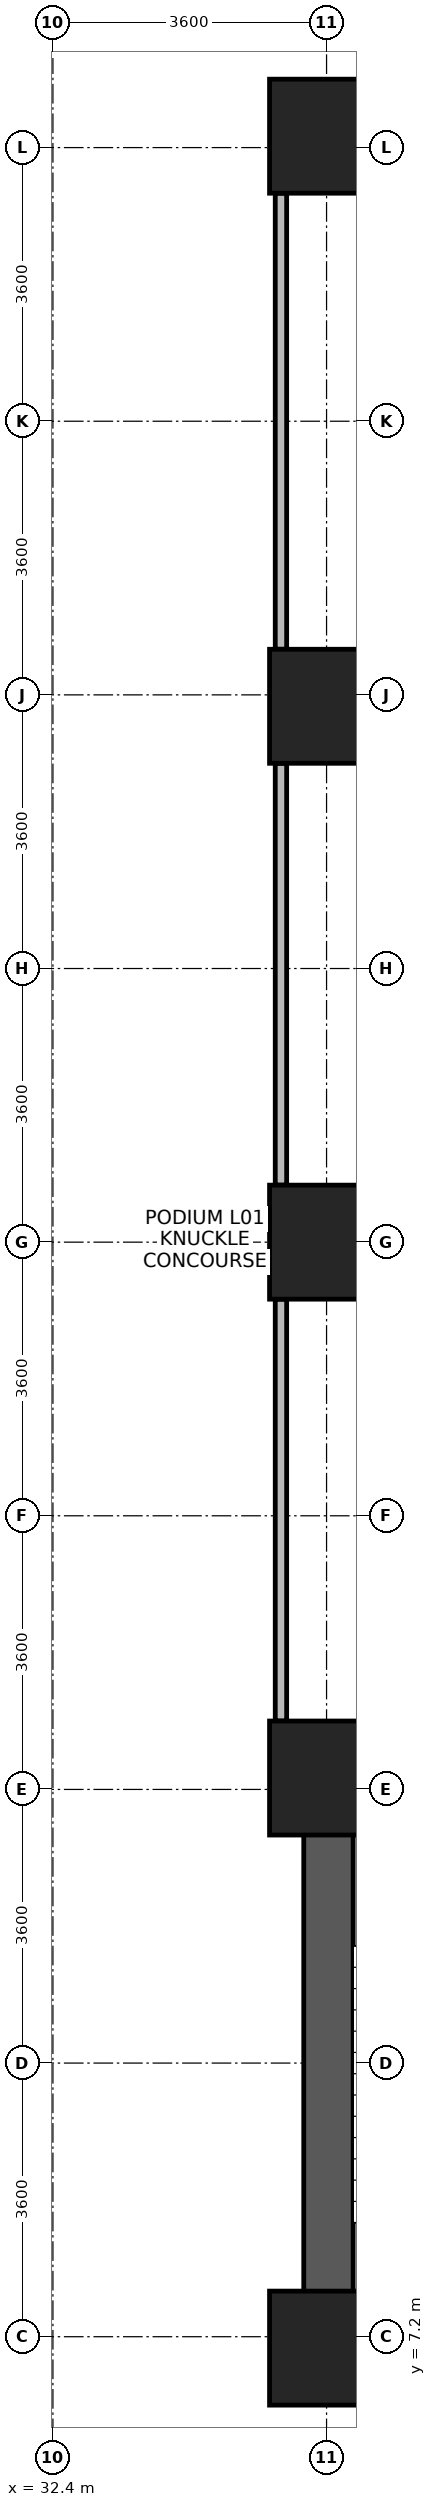
"""IFC4 building model, lengths in metres.
Left out: names, types, materials, properties, quantities, classifications, styles, units other than length and angle.
Written with IfcOpenShell. Run it as: python <this file> out.ifc"""

import sys

from ifc_helpers import new_model, si_unit, direction, frame, frame_2d, origin, origin_2d, place, context, subcontext, project, spatial, rectangle, extrude, source, transform, mapped, element, save


model = new_model("IFC4")
c1 = context("Model", 3, precision=1e-05, world=origin(), true_north=direction((0.0, 1.0)))
c2 = subcontext(c1, "Body", "Model", "MODEL_VIEW")
j1 = project(units=[si_unit("LENGTHUNIT", "METRE"), si_unit("PLANEANGLEUNIT", "RADIAN")], contexts=[c1])
p1 = place(None, origin())
s1 = spatial("IfcSite", under=j1, at=p1, CompositionType="ELEMENT")
p2 = place(p1, origin())
s2 = spatial("IfcBuilding", under=s1, at=p2, CompositionType="ELEMENT")
p3 = place(p2, frame((0.0, 0.0, 5.4)))
s3 = spatial("IfcBuildingStorey", under=s2, at=p3, CompositionType="ELEMENT", Elevation=5.4)
p4 = place(p3, frame((36.025, 6.65, 0.0), z_axis=(0.0, 0.0, 1.0), x_axis=(0.0, 1.0, 0.0)))
e1 = element("IfcWall", 1, at=p4, inside=s3, PredefinedType="SHEAR", context=c2, shape_type="SweptSolid", body=[
    extrude(rectangle(XDim=8.3, YDim=0.65, at=frame_2d((4.15, 0.0))), origin(), (0.0, 0.0, 1.0), 4.52),
])
for number, where, z_axis, x_axis in (
    (2, (36.35, 6.975, 0.0), (0.0, 0.0, 1.0), (1.0, 0.0, 0.0)),
    (3, (36.35, 14.625, 0.0), (0.0, 0.0, 1.0), (1.0, 0.0, 0.0)),
):
    element("IfcWall", number, at=place(p3, frame(where, z_axis=z_axis, x_axis=x_axis)), inside=s3, PredefinedType="SHEAR", context=c2, shape_type="SweptSolid", body=[
        extrude(rectangle(XDim=3.2, YDim=0.65, at=frame_2d((1.6, 0.0))), origin(), (0.0, 0.0, 1.0), 4.52),
    ])
m1 = source(origin(), c2, "Body", "SweptSolid", [
    extrude(rectangle(XDim=1.5, YDim=1.5, at=origin_2d()), origin(), (0.0, 0.0, 1.0), 4.8),
])
for number, where, z_axis, x_axis in (
    (4, (36.0, 21.6, 0.0), (0.0, 0.0, 1.0), (1.0, 0.0, 0.0)),
    (5, (36.0, 28.65, 0.0), (0.0, 0.0, 1.0), (1.0, 0.0, 0.0)),
    (6, (36.0, 36.15, 0.0), (0.0, 0.0, 1.0), (1.0, 0.0, 0.0)),
    (7, (36.0, 7.05, 0.0), (0.0, 0.0, 1.0), (1.0, 0.0, 0.0)),
    (8, (36.0, 14.55, 0.0), (0.0, 0.0, 1.0), (1.0, 0.0, 0.0)),
):
    element("IfcColumn", number, at=place(p3, frame(where, z_axis=z_axis, x_axis=x_axis)), inside=s3, PredefinedType="COLUMN", context=c2, shape_type="MappedRepresentation", body=[
        mapped(m1, transform((0.0, 0.0, 0.0), x_axis=(1.0, 0.0, 0.0), y_axis=(0.0, 1.0, 0.0), z_axis=(0.0, 0.0, 1.0), scale=1.0)),
    ])
p5 = place(p3, frame((35.4, 15.3, 0.0), z_axis=(0.0, 0.0, 1.0), x_axis=(0.0, 1.0, 0.0)))
e9 = element("IfcWall", 9, at=p5, inside=s3, PredefinedType="PARTITIONING", context=c2, shape_type="SweptSolid", body=[
    extrude(rectangle(XDim=5.55, YDim=0.15, at=frame_2d((2.775, 0.0))), origin(), (0.0, 0.0, 1.0), 4.5),
])
p6 = place(p3, frame((35.4, 22.35, 0.0), z_axis=(0.0, 0.0, 1.0), x_axis=(0.0, 1.0, 0.0)))
e10 = element("IfcWall", 10, at=p6, inside=s3, PredefinedType="PARTITIONING", context=c2, shape_type="SweptSolid", body=[
    extrude(rectangle(XDim=5.55, YDim=0.15, at=frame_2d((2.775, 0.0))), origin(), (0.0, 0.0, 1.0), 4.5),
])
p7 = place(p3, frame((35.4, 29.4, 0.0), z_axis=(0.0, 0.0, 1.0), x_axis=(0.0, 1.0, 0.0)))
e11 = element("IfcWall", 11, at=p7, inside=s3, PredefinedType="PARTITIONING", context=c2, shape_type="SweptSolid", body=[
    extrude(rectangle(XDim=6.0, YDim=0.15, at=frame_2d((3.0, 0.0))), origin(), (0.0, 0.0, 1.0), 4.5),
])
save(model, sys.argv[1])
